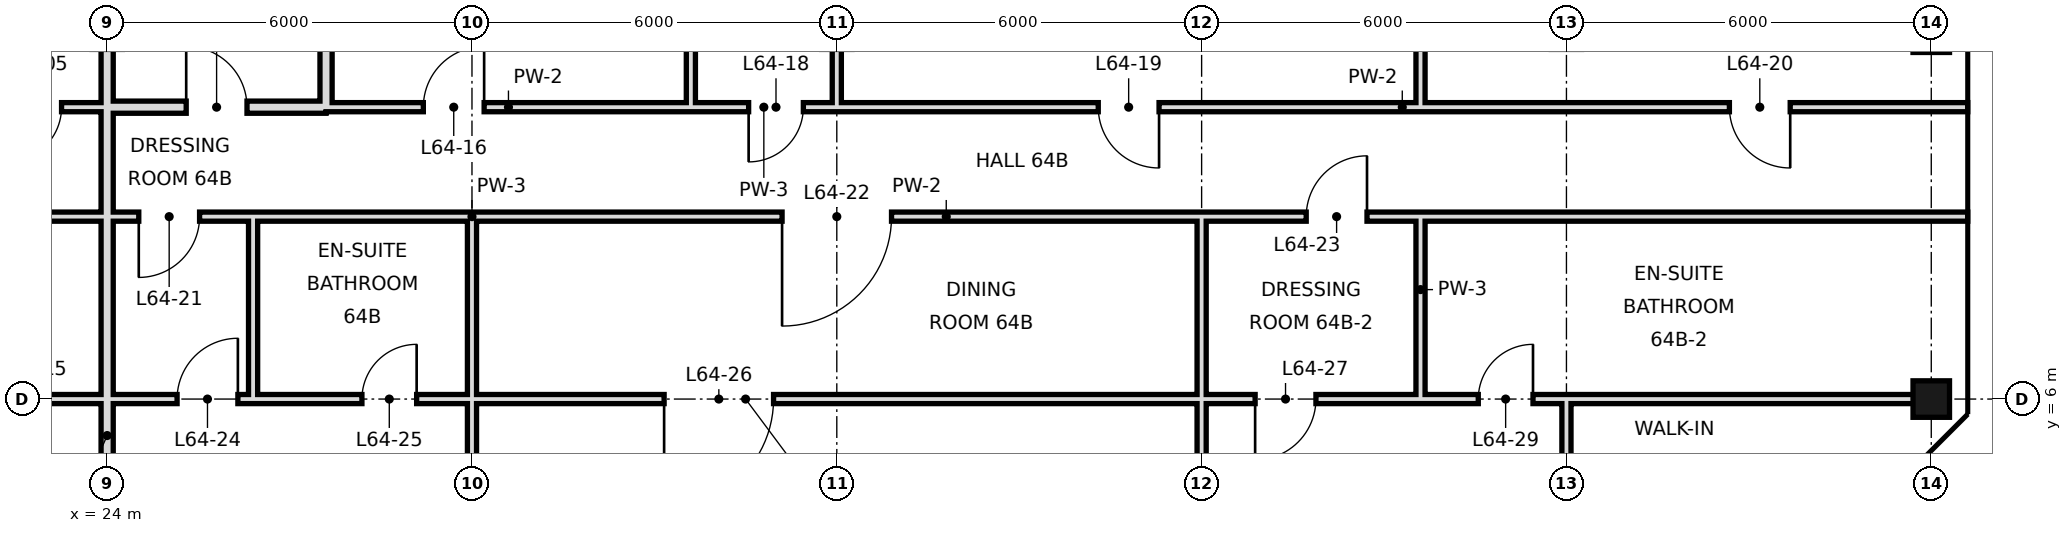
"""IFC4 building model, lengths in metres.
Left out: names, types, materials, properties, quantities, classifications, styles, units other than length and angle.
Written with IfcOpenShell. Run it as: python <this file> out.ifc"""

import sys

from ifc_helpers import new_model, si_unit, direction, frame, frame_2d, origin, origin_2d, place, context, subcontext, project, spatial, rectangle, hollow_rectangle, extrude, element, fill, save


model = new_model("IFC4")
c1 = context("Model", 3, precision=1e-05, world=origin(), true_north=direction((0.0, 1.0)))
c2 = subcontext(c1, "Body", "Model", "MODEL_VIEW")
j1 = project(units=[si_unit("LENGTHUNIT", "METRE"), si_unit("PLANEANGLEUNIT", "RADIAN")], contexts=[c1])
p1 = place(None, origin())
s1 = spatial("IfcSite", under=j1, at=p1, CompositionType="ELEMENT")
p2 = place(p1, origin())
s2 = spatial("IfcBuilding", under=s1, at=p2, CompositionType="ELEMENT")
p3 = place(p2, frame((0.0, 0.0, 270.2)))
s3 = spatial("IfcBuildingStorey", under=s2, at=p3, CompositionType="ELEMENT", Elevation=270.2)
p4 = place(p3, frame((54.0, 6.0, 0.0), z_axis=(0.0, 0.0, 1.0), x_axis=(1.0, 0.0, 0.0)))
e1 = element("IfcColumn", 1, at=p4, inside=s3, PredefinedType="COLUMN", context=c2, shape_type="SweptSolid", body=[
    extrude(hollow_rectangle(XDim=0.6, YDim=0.6, WallThickness=0.028, at=origin_2d()), origin(), (0.0, 0.0, 1.0), 3.6),
])
p5 = place(p3, frame((24.0, 10.8, 0.0), z_axis=(0.0, 0.0, 1.0), x_axis=(0.0, 1.0, 0.0)))
e2 = element("IfcWall", 2, at=p5, inside=s3, PredefinedType="SOLIDWALL", context=c2, shape_type="SweptSolid", body=[
    extrude(rectangle(XDim=7.9, YDim=0.2, at=frame_2d((3.95, 0.0))), origin(), (0.0, 0.0, 1.0), 2.72),
])
p6 = place(p3, frame((24.0, 0.0, 0.0), z_axis=(0.0, 0.0, 1.0), x_axis=(0.0, 1.0, 0.0)))
e3 = element("IfcWall", 3, at=p6, inside=s3, PredefinedType="SOLIDWALL", context=c2, shape_type="SweptSolid", body=[
    extrude(rectangle(XDim=10.8, YDim=0.2, at=frame_2d((5.4, 0.0))), origin(), (0.0, 0.0, 1.0), 2.72),
])
p7 = place(p3, frame((26.4, 6.0, 0.0), z_axis=(0.0, 0.0, 1.0), x_axis=(0.0, 1.0, 0.0)))
e4 = element("IfcWall", 4, at=p7, inside=s3, PredefinedType="PARTITIONING", context=c2, shape_type="SweptSolid", body=[
    extrude(rectangle(XDim=3.0, YDim=0.15, at=frame_2d((1.5, 0.0))), origin(), (0.0, 0.0, 1.0), 3.42),
])
p8 = place(p3, frame((27.6, 10.8, 0.0), z_axis=(0.0, 0.0, 1.0), x_axis=(0.0, 1.0, 0.0)))
e5 = element("IfcWall", 5, at=p8, inside=s3, PredefinedType="SOLIDWALL", context=c2, shape_type="SweptSolid", body=[
    extrude(rectangle(XDim=7.9, YDim=0.2, at=frame_2d((3.95, 0.0))), origin(), (0.0, 0.0, 1.0), 2.72),
])
p9 = place(p3, frame((30.0, -0.6, 0.0), z_axis=(0.0, 0.0, 1.0), x_axis=(0.0, 1.0, 0.0)))
e6 = element("IfcWall", 6, at=p9, inside=s3, PredefinedType="PARTITIONING", context=c2, shape_type="SweptSolid", body=[
    extrude(rectangle(XDim=6.6, YDim=0.15, at=frame_2d((3.3, 0.0))), origin(), (0.0, 0.0, 1.0), 2.72),
])
p10 = place(p3, frame((30.0, 6.0, 0.0), z_axis=(0.0, 0.0, 1.0), x_axis=(0.0, 1.0, 0.0)))
e7 = element("IfcWall", 7, at=p10, inside=s3, PredefinedType="PARTITIONING", context=c2, shape_type="SweptSolid", body=[
    extrude(rectangle(XDim=3.0, YDim=0.15, at=frame_2d((1.5, 0.0))), origin(), (0.0, 0.0, 1.0), 2.72),
])
p11 = place(p3, frame((33.6, 10.8, 0.0), z_axis=(0.0, 0.0, 1.0), x_axis=(0.0, 1.0, 0.0)))
e8 = element("IfcWall", 8, at=p11, inside=s3, PredefinedType="PARTITIONING", context=c2, shape_type="SweptSolid", body=[
    extrude(rectangle(XDim=7.9, YDim=0.15, at=frame_2d((3.95, 0.0))), origin(), (0.0, 0.0, 1.0), 3.42),
])
p12 = place(p3, frame((36.0, 10.8, 0.0), z_axis=(0.0, 0.0, 1.0), x_axis=(0.0, 1.0, 0.0)))
e9 = element("IfcWall", 9, at=p12, inside=s3, PredefinedType="PARTITIONING", context=c2, shape_type="SweptSolid", body=[
    extrude(rectangle(XDim=7.9, YDim=0.15, at=frame_2d((3.95, 0.0))), origin(), (0.0, 0.0, 1.0), 2.72),
])
p13 = place(p3, frame((42.0, -0.6, 0.0), z_axis=(0.0, 0.0, 1.0), x_axis=(0.0, 1.0, 0.0)))
e10 = element("IfcWall", 10, at=p13, inside=s3, PredefinedType="PARTITIONING", context=c2, shape_type="SweptSolid", body=[
    extrude(rectangle(XDim=9.6, YDim=0.15, at=frame_2d((4.8, 0.0))), origin(), (0.0, 0.0, 1.0), 2.72),
])
p14 = place(p3, frame((45.6, 10.8, 0.0), z_axis=(0.0, 0.0, 1.0), x_axis=(0.0, 1.0, 0.0)))
e11 = element("IfcWall", 11, at=p14, inside=s3, PredefinedType="PARTITIONING", context=c2, shape_type="SweptSolid", body=[
    extrude(rectangle(XDim=7.2, YDim=0.15, at=frame_2d((3.6, 0.0))), origin(), (0.0, 0.0, 1.0), 3.42),
])
p15 = place(p3, frame((45.6, 6.0, 0.0), z_axis=(0.0, 0.0, 1.0), x_axis=(0.0, 1.0, 0.0)))
e12 = element("IfcWall", 12, at=p15, inside=s3, PredefinedType="PARTITIONING", context=c2, shape_type="SweptSolid", body=[
    extrude(rectangle(XDim=3.0, YDim=0.15, at=frame_2d((1.5, 0.0))), origin(), (0.0, 0.0, 1.0), 3.42),
])
p16 = place(p3, frame((48.0, 0.0, 0.0), z_axis=(0.0, 0.0, 1.0), x_axis=(0.0, 1.0, 0.0)))
e13 = element("IfcWall", 13, at=p16, inside=s3, PredefinedType="PARTITIONING", context=c2, shape_type="SweptSolid", body=[
    extrude(rectangle(XDim=6.0, YDim=0.15, at=frame_2d((3.0, 0.0))), origin(), (0.0, 0.0, 1.0), 2.72),
])
p17 = place(p16, frame((3.4, 0.0, 0.0)))
e14 = element("IfcOpeningElement", 14, at=p17, cuts=e13, PredefinedType="OPENING", context=c2, shape_type="SweptSolid", body=[
    extrude(rectangle(XDim=1.0, YDim=2.4, at=frame_2d((0.5, 1.2))), frame((0.0, 0.085, 0.0), z_axis=(0.0, -1.0, 0.0), x_axis=(1.0, 0.0, 0.0)), (0.0, 0.0, 1.0), 0.17),
])
p18 = place(p3, frame((24.0, 10.8, 0.0), z_axis=(0.0, 0.0, 1.0), x_axis=(1.0, 0.0, 0.0)))
e15 = element("IfcWall", 15, at=p18, inside=s3, PredefinedType="SOLIDWALL", context=c2, shape_type="SweptSolid", body=[
    extrude(rectangle(XDim=3.6, YDim=0.2, at=frame_2d((1.8, 0.0))), origin(), (0.0, 0.0, 1.0), 2.72),
])
p19 = place(p18, frame((1.3, 0.0, 0.0)))
e16 = element("IfcOpeningElement", 16, at=p19, cuts=e15, PredefinedType="OPENING", context=c2, shape_type="SweptSolid", body=[
    extrude(rectangle(XDim=1.0, YDim=2.4, at=frame_2d((0.5, 1.2))), frame((0.0, 0.11, 0.0), z_axis=(0.0, -1.0, 0.0), x_axis=(1.0, 0.0, 0.0)), (0.0, 0.0, 1.0), 0.22),
])
p20 = place(p3, frame((27.6, 10.8, 0.0), z_axis=(0.0, 0.0, 1.0), x_axis=(1.0, 0.0, 0.0)))
e17 = element("IfcWall", 17, at=p20, inside=s3, PredefinedType="PARTITIONING", context=c2, shape_type="SweptSolid", body=[
    extrude(rectangle(XDim=6.0, YDim=0.15, at=frame_2d((3.0, 0.0))), origin(), (0.0, 0.0, 1.0), 3.42),
])
p21 = place(p20, frame((1.6, 0.0, 0.0)))
e18 = element("IfcOpeningElement", 18, at=p21, cuts=e17, PredefinedType="OPENING", context=c2, shape_type="SweptSolid", body=[
    extrude(rectangle(XDim=1.0, YDim=2.4, at=frame_2d((0.5, 1.2))), frame((0.0, 0.085, 0.0), z_axis=(0.0, -1.0, 0.0), x_axis=(1.0, 0.0, 0.0)), (0.0, 0.0, 1.0), 0.17),
])
p22 = place(p3, frame((36.0, 10.8, 0.0), z_axis=(0.0, 0.0, 1.0), x_axis=(1.0, 0.0, 0.0)))
e19 = element("IfcWall", 19, at=p22, inside=s3, PredefinedType="PARTITIONING", context=c2, shape_type="SweptSolid", body=[
    extrude(rectangle(XDim=18.6, YDim=0.15, at=frame_2d((9.3, 0.0))), origin(), (0.0, 0.0, 1.0), 3.42),
])
p23 = place(p22, frame((4.3, 0.0, 0.0)))
e20 = element("IfcOpeningElement", 20, at=p23, cuts=e19, PredefinedType="OPENING", context=c2, shape_type="SweptSolid", body=[
    extrude(rectangle(XDim=1.0, YDim=2.4, at=frame_2d((0.5, 1.2))), frame((0.0, 0.085, 0.0), z_axis=(0.0, -1.0, 0.0), x_axis=(1.0, 0.0, 0.0)), (0.0, 0.0, 1.0), 0.17),
])
p24 = place(p22, frame((14.68, 0.0, 0.0)))
e21 = element("IfcOpeningElement", 21, at=p24, cuts=e19, PredefinedType="OPENING", context=c2, shape_type="SweptSolid", body=[
    extrude(rectangle(XDim=1.0, YDim=2.4, at=frame_2d((0.5, 1.2))), frame((0.0, 0.085, 0.0), z_axis=(0.0, -1.0, 0.0), x_axis=(1.0, 0.0, 0.0)), (0.0, 0.0, 1.0), 0.17),
])
p25 = place(p3, frame((21.6, 10.8, 0.0), z_axis=(0.0, 0.0, 1.0), x_axis=(1.0, 0.0, 0.0)))
e22 = element("IfcWall", 22, at=p25, inside=s3, PredefinedType="PARTITIONING", context=c2, shape_type="SweptSolid", body=[
    extrude(rectangle(XDim=2.4, YDim=0.15, at=frame_2d((1.2, 0.0))), origin(), (0.0, 0.0, 1.0), 3.42),
])
p26 = place(p25, frame((0.75, 0.0, 0.0)))
e23 = element("IfcOpeningElement", 23, at=p26, cuts=e22, PredefinedType="OPENING", context=c2, shape_type="SweptSolid", body=[
    extrude(rectangle(XDim=0.9, YDim=2.4, at=frame_2d((0.45, 1.2))), frame((0.0, 0.085, 0.0), z_axis=(0.0, -1.0, 0.0), x_axis=(1.0, 0.0, 0.0)), (0.0, 0.0, 1.0), 0.17),
])
p27 = place(p3, frame((33.6, 10.8, 0.0), z_axis=(0.0, 0.0, 1.0), x_axis=(1.0, 0.0, 0.0)))
e24 = element("IfcWall", 24, at=p27, inside=s3, PredefinedType="PARTITIONING", context=c2, shape_type="SweptSolid", body=[
    extrude(rectangle(XDim=2.4, YDim=0.15, at=frame_2d((1.2, 0.0))), origin(), (0.0, 0.0, 1.0), 3.42),
])
p28 = place(p27, frame((0.95, 0.0, 0.0)))
e25 = element("IfcOpeningElement", 25, at=p28, cuts=e24, PredefinedType="OPENING", context=c2, shape_type="SweptSolid", body=[
    extrude(rectangle(XDim=0.9, YDim=2.4, at=frame_2d((0.45, 1.2))), frame((0.0, 0.085, 0.0), z_axis=(0.0, -1.0, 0.0), x_axis=(1.0, 0.0, 0.0)), (0.0, 0.0, 1.0), 0.17),
])
p29 = place(p3, frame((24.0, 6.0, 0.0), z_axis=(0.0, 0.0, 1.0), x_axis=(1.0, 0.0, 0.0)))
e26 = element("IfcWall", 26, at=p29, inside=s3, PredefinedType="PARTITIONING", context=c2, shape_type="SweptSolid", body=[
    extrude(rectangle(XDim=2.4, YDim=0.15, at=frame_2d((1.2, 0.0))), origin(), (0.0, 0.0, 1.0), 2.97),
])
p30 = place(p29, frame((1.15, 0.0, 0.0)))
e27 = element("IfcOpeningElement", 27, at=p30, cuts=e26, PredefinedType="OPENING", context=c2, shape_type="SweptSolid", body=[
    extrude(rectangle(XDim=1.0, YDim=2.4, at=frame_2d((0.5, 1.2))), frame((0.0, 0.085, 0.0), z_axis=(0.0, -1.0, 0.0), x_axis=(1.0, 0.0, 0.0)), (0.0, 0.0, 1.0), 0.17),
])
p31 = place(p3, frame((30.0, 6.0, 0.0), z_axis=(0.0, 0.0, 1.0), x_axis=(1.0, 0.0, 0.0)))
e28 = element("IfcWall", 28, at=p31, inside=s3, PredefinedType="PARTITIONING", context=c2, shape_type="SweptSolid", body=[
    extrude(rectangle(XDim=15.6, YDim=0.15, at=frame_2d((7.8, 0.0))), origin(), (0.0, 0.0, 1.0), 2.97),
])
p32 = place(p31, frame((3.16, 0.0, 0.0)))
e29 = element("IfcOpeningElement", 29, at=p32, cuts=e28, PredefinedType="OPENING", context=c2, shape_type="SweptSolid", body=[
    extrude(rectangle(XDim=1.8, YDim=2.4, at=frame_2d((0.9, 1.2))), frame((0.0, 0.085, 0.0), z_axis=(0.0, -1.0, 0.0), x_axis=(1.0, 0.0, 0.0)), (0.0, 0.0, 1.0), 0.17),
])
p33 = place(p31, frame((12.88, 0.0, 0.0)))
e30 = element("IfcOpeningElement", 30, at=p33, cuts=e28, PredefinedType="OPENING", context=c2, shape_type="SweptSolid", body=[
    extrude(rectangle(XDim=1.0, YDim=2.4, at=frame_2d((0.5, 1.2))), frame((0.0, 0.085, 0.0), z_axis=(0.0, -1.0, 0.0), x_axis=(1.0, 0.0, 0.0)), (0.0, 0.0, 1.0), 0.17),
])
p34 = place(p3, frame((21.6, 6.0, 0.0), z_axis=(0.0, 0.0, 1.0), x_axis=(1.0, 0.0, 0.0)))
e31 = element("IfcWall", 31, at=p34, inside=s3, PredefinedType="PARTITIONING", context=c2, shape_type="SweptSolid", body=[
    extrude(rectangle(XDim=2.4, YDim=0.15, at=frame_2d((1.2, 0.0))), origin(), (0.0, 0.0, 1.0), 2.97),
])
p35 = place(p34, frame((0.25, 0.0, 0.0)))
e32 = element("IfcOpeningElement", 32, at=p35, cuts=e31, PredefinedType="OPENING", context=c2, shape_type="SweptSolid", body=[
    extrude(rectangle(XDim=0.9, YDim=2.4, at=frame_2d((0.45, 1.2))), frame((0.0, 0.085, 0.0), z_axis=(0.0, -1.0, 0.0), x_axis=(1.0, 0.0, 0.0)), (0.0, 0.0, 1.0), 0.17),
])
p36 = place(p3, frame((26.4, 6.0, 0.0), z_axis=(0.0, 0.0, 1.0), x_axis=(1.0, 0.0, 0.0)))
e33 = element("IfcWall", 33, at=p36, inside=s3, PredefinedType="PARTITIONING", context=c2, shape_type="SweptSolid", body=[
    extrude(rectangle(XDim=3.6, YDim=0.15, at=frame_2d((1.8, 0.0))), origin(), (0.0, 0.0, 1.0), 2.97),
])
p37 = place(p36, frame((1.79, 0.0, 0.0)))
e34 = element("IfcOpeningElement", 34, at=p37, cuts=e33, PredefinedType="OPENING", context=c2, shape_type="SweptSolid", body=[
    extrude(rectangle(XDim=0.9, YDim=2.4, at=frame_2d((0.45, 1.2))), frame((0.0, 0.085, 0.0), z_axis=(0.0, -1.0, 0.0), x_axis=(1.0, 0.0, 0.0)), (0.0, 0.0, 1.0), 0.17),
])
p38 = place(p3, frame((45.6, 6.0, 0.0), z_axis=(0.0, 0.0, 1.0), x_axis=(1.0, 0.0, 0.0)))
e35 = element("IfcWall", 35, at=p38, inside=s3, PredefinedType="PARTITIONING", context=c2, shape_type="SweptSolid", body=[
    extrude(rectangle(XDim=8.4, YDim=0.15, at=frame_2d((4.2, 0.0))), origin(), (0.0, 0.0, 1.0), 2.97),
])
p39 = place(p38, frame((0.95, 0.0, 0.0)))
e36 = element("IfcOpeningElement", 36, at=p39, cuts=e35, PredefinedType="OPENING", context=c2, shape_type="SweptSolid", body=[
    extrude(rectangle(XDim=0.9, YDim=2.4, at=frame_2d((0.45, 1.2))), frame((0.0, 0.085, 0.0), z_axis=(0.0, -1.0, 0.0), x_axis=(1.0, 0.0, 0.0)), (0.0, 0.0, 1.0), 0.17),
])
p40 = place(p3, frame((24.0, 9.0, 0.0), z_axis=(0.0, 0.0, 1.0), x_axis=(1.0, 0.0, 0.0)))
e37 = element("IfcWall", 37, at=p40, inside=s3, PredefinedType="PARTITIONING", context=c2, shape_type="SweptSolid", body=[
    extrude(rectangle(XDim=2.4, YDim=0.15, at=frame_2d((1.2, 0.0))), origin(), (0.0, 0.0, 1.0), 3.42),
])
p41 = place(p40, frame((0.52, 0.0, 0.0)))
e38 = element("IfcOpeningElement", 38, at=p41, cuts=e37, PredefinedType="OPENING", context=c2, shape_type="SweptSolid", body=[
    extrude(rectangle(XDim=1.0, YDim=2.4, at=frame_2d((0.5, 1.2))), frame((0.0, 0.085, 0.0), z_axis=(0.0, -1.0, 0.0), x_axis=(1.0, 0.0, 0.0)), (0.0, 0.0, 1.0), 0.17),
])
p42 = place(p3, frame((30.0, 9.0, 0.0), z_axis=(0.0, 0.0, 1.0), x_axis=(1.0, 0.0, 0.0)))
e39 = element("IfcWall", 39, at=p42, inside=s3, PredefinedType="PARTITIONING", context=c2, shape_type="SweptSolid", body=[
    extrude(rectangle(XDim=15.6, YDim=0.15, at=frame_2d((7.8, 0.0))), origin(), (0.0, 0.0, 1.0), 3.42),
])
p43 = place(p42, frame((5.1, 0.0, 0.0)))
e40 = element("IfcOpeningElement", 40, at=p43, cuts=e39, PredefinedType="OPENING", context=c2, shape_type="SweptSolid", body=[
    extrude(rectangle(XDim=1.8, YDim=2.4, at=frame_2d((0.9, 1.2))), frame((0.0, 0.085, 0.0), z_axis=(0.0, -1.0, 0.0), x_axis=(1.0, 0.0, 0.0)), (0.0, 0.0, 1.0), 0.17),
])
p44 = place(p42, frame((13.72, 0.0, 0.0)))
e41 = element("IfcOpeningElement", 41, at=p44, cuts=e39, PredefinedType="OPENING", context=c2, shape_type="SweptSolid", body=[
    extrude(rectangle(XDim=1.0, YDim=2.4, at=frame_2d((0.5, 1.2))), frame((0.0, 0.085, 0.0), z_axis=(0.0, -1.0, 0.0), x_axis=(1.0, 0.0, 0.0)), (0.0, 0.0, 1.0), 0.17),
])
p45 = place(p3, frame((21.6, 9.0, 0.0), z_axis=(0.0, 0.0, 1.0), x_axis=(1.0, 0.0, 0.0)))
e42 = element("IfcWall", 42, at=p45, inside=s3, PredefinedType="PARTITIONING", context=c2, shape_type="SweptSolid", body=[
    extrude(rectangle(XDim=2.4, YDim=0.15, at=frame_2d((1.2, 0.0))), origin(), (0.0, 0.0, 1.0), 3.42),
])
p46 = place(p3, frame((26.4, 9.0, 0.0), z_axis=(0.0, 0.0, 1.0), x_axis=(1.0, 0.0, 0.0)))
e43 = element("IfcWall", 43, at=p46, inside=s3, PredefinedType="PARTITIONING", context=c2, shape_type="SweptSolid", body=[
    extrude(rectangle(XDim=3.6, YDim=0.15, at=frame_2d((1.8, 0.0))), origin(), (0.0, 0.0, 1.0), 3.42),
])
p47 = place(p3, frame((45.6, 9.0, 0.0), z_axis=(0.0, 0.0, 1.0), x_axis=(1.0, 0.0, 0.0)))
e44 = element("IfcWall", 44, at=p47, inside=s3, PredefinedType="PARTITIONING", context=c2, shape_type="SweptSolid", body=[
    extrude(rectangle(XDim=9.0, YDim=0.15, at=frame_2d((4.5, 0.0))), origin(), (0.0, 0.0, 1.0), 3.42),
])
p48 = place(p26, frame((0.9, 0.0, 0.0), z_axis=(0.0, 0.0, 1.0), x_axis=(-1.0, 0.0, 0.0)))
e45 = element("IfcDoor", 45, at=p48, inside=s3, OperationType="SINGLE_SWING_RIGHT", PredefinedType="DOOR", context=c2, shape_type="SweptSolid", body=[
    extrude(rectangle(XDim=0.9, YDim=2.4, at=frame_2d((0.45, 1.2))), frame((0.0, 0.025, 0.0), z_axis=(0.0, -1.0, 0.0), x_axis=(1.0, 0.0, 0.0)), (0.0, 0.0, 1.0), 0.05),
])
fill(e23, e45)
p49 = place(p21, frame((1.0, 0.0, 0.0), z_axis=(0.0, 0.0, 1.0), x_axis=(-1.0, 0.0, 0.0)))
e46 = element("IfcDoor", 46, at=p49, inside=s3, OperationType="SINGLE_SWING_LEFT", PredefinedType="DOOR", context=c2, shape_type="SweptSolid", body=[
    extrude(rectangle(XDim=1.0, YDim=2.4, at=frame_2d((0.5, 1.2))), frame((0.0, 0.025, 0.0), z_axis=(0.0, -1.0, 0.0), x_axis=(1.0, 0.0, 0.0)), (0.0, 0.0, 1.0), 0.05),
])
fill(e18, e46)
p50 = place(p19, origin())
e47 = element("IfcDoor", 47, at=p50, inside=s3, OperationType="SINGLE_SWING_LEFT", PredefinedType="DOOR", context=c2, shape_type="SweptSolid", body=[
    extrude(rectangle(XDim=1.0, YDim=2.4, at=frame_2d((0.5, 1.2))), frame((0.0, 0.025, 0.0), z_axis=(0.0, -1.0, 0.0), x_axis=(1.0, 0.0, 0.0)), (0.0, 0.0, 1.0), 0.05),
])
fill(e16, e47)
p51 = place(p28, frame((0.9, 0.0, 0.0), z_axis=(0.0, 0.0, 1.0), x_axis=(-1.0, 0.0, 0.0)))
e48 = element("IfcDoor", 48, at=p51, inside=s3, OperationType="SINGLE_SWING_RIGHT", PredefinedType="DOOR", context=c2, shape_type="SweptSolid", body=[
    extrude(rectangle(XDim=0.9, YDim=2.4, at=frame_2d((0.45, 1.2))), frame((0.0, 0.025, 0.0), z_axis=(0.0, -1.0, 0.0), x_axis=(1.0, 0.0, 0.0)), (0.0, 0.0, 1.0), 0.05),
])
fill(e25, e48)
p52 = place(p23, origin())
e49 = element("IfcDoor", 49, at=p52, inside=s3, OperationType="SINGLE_SWING_RIGHT", PredefinedType="DOOR", context=c2, shape_type="SweptSolid", body=[
    extrude(rectangle(XDim=1.0, YDim=2.4, at=frame_2d((0.5, 1.2))), frame((0.0, 0.025, 0.0), z_axis=(0.0, -1.0, 0.0), x_axis=(1.0, 0.0, 0.0)), (0.0, 0.0, 1.0), 0.05),
])
fill(e20, e49)
p53 = place(p24, origin())
e50 = element("IfcDoor", 50, at=p53, inside=s3, OperationType="SINGLE_SWING_RIGHT", PredefinedType="DOOR", context=c2, shape_type="SweptSolid", body=[
    extrude(rectangle(XDim=1.0, YDim=2.4, at=frame_2d((0.5, 1.2))), frame((0.0, 0.025, 0.0), z_axis=(0.0, -1.0, 0.0), x_axis=(1.0, 0.0, 0.0)), (0.0, 0.0, 1.0), 0.05),
])
fill(e21, e50)
p54 = place(p41, frame((1.0, 0.0, 0.0), z_axis=(0.0, 0.0, 1.0), x_axis=(-1.0, 0.0, 0.0)))
e51 = element("IfcDoor", 51, at=p54, inside=s3, OperationType="SINGLE_SWING_RIGHT", PredefinedType="DOOR", context=c2, shape_type="SweptSolid", body=[
    extrude(rectangle(XDim=1.0, YDim=2.4, at=frame_2d((0.5, 1.2))), frame((0.0, 0.025, 0.0), z_axis=(0.0, -1.0, 0.0), x_axis=(1.0, 0.0, 0.0)), (0.0, 0.0, 1.0), 0.05),
])
fill(e38, e51)
p55 = place(p43, frame((1.8, 0.0, 0.0), z_axis=(0.0, 0.0, 1.0), x_axis=(-1.0, 0.0, 0.0)))
e52 = element("IfcDoor", 52, at=p55, inside=s3, OperationType="SINGLE_SWING_RIGHT", PredefinedType="DOOR", context=c2, shape_type="SweptSolid", body=[
    extrude(rectangle(XDim=1.8, YDim=2.4, at=frame_2d((0.9, 1.2))), frame((0.0, 0.025, 0.0), z_axis=(0.0, -1.0, 0.0), x_axis=(1.0, 0.0, 0.0)), (0.0, 0.0, 1.0), 0.05),
])
fill(e40, e52)
p56 = place(p44, frame((1.0, 0.0, 0.0), z_axis=(0.0, 0.0, 1.0), x_axis=(-1.0, 0.0, 0.0)))
e53 = element("IfcDoor", 53, at=p56, inside=s3, OperationType="SINGLE_SWING_LEFT", PredefinedType="DOOR", context=c2, shape_type="SweptSolid", body=[
    extrude(rectangle(XDim=1.0, YDim=2.4, at=frame_2d((0.5, 1.2))), frame((0.0, 0.025, 0.0), z_axis=(0.0, -1.0, 0.0), x_axis=(1.0, 0.0, 0.0)), (0.0, 0.0, 1.0), 0.05),
])
fill(e41, e53)
p57 = place(p30, frame((1.0, 0.0, 0.0), z_axis=(0.0, 0.0, 1.0), x_axis=(-1.0, 0.0, 0.0)))
e54 = element("IfcDoor", 54, at=p57, inside=s3, OperationType="SINGLE_SWING_LEFT", PredefinedType="DOOR", context=c2, shape_type="SweptSolid", body=[
    extrude(rectangle(XDim=1.0, YDim=2.4, at=frame_2d((0.5, 1.2))), frame((0.0, 0.025, 0.0), z_axis=(0.0, -1.0, 0.0), x_axis=(1.0, 0.0, 0.0)), (0.0, 0.0, 1.0), 0.05),
])
fill(e27, e54)
p58 = place(p37, frame((0.9, 0.0, 0.0), z_axis=(0.0, 0.0, 1.0), x_axis=(-1.0, 0.0, 0.0)))
e55 = element("IfcDoor", 55, at=p58, inside=s3, OperationType="SINGLE_SWING_LEFT", PredefinedType="DOOR", context=c2, shape_type="SweptSolid", body=[
    extrude(rectangle(XDim=0.9, YDim=2.4, at=frame_2d((0.45, 1.2))), frame((0.0, 0.025, 0.0), z_axis=(0.0, -1.0, 0.0), x_axis=(1.0, 0.0, 0.0)), (0.0, 0.0, 1.0), 0.05),
])
fill(e34, e55)
p59 = place(p32, frame((1.8, 0.0, 0.0), z_axis=(0.0, 0.0, 1.0), x_axis=(-1.0, 0.0, 0.0)))
e56 = element("IfcDoor", 56, at=p59, inside=s3, OperationType="SINGLE_SWING_RIGHT", PredefinedType="DOOR", context=c2, shape_type="SweptSolid", body=[
    extrude(rectangle(XDim=1.8, YDim=2.4, at=frame_2d((0.9, 1.2))), frame((0.0, 0.025, 0.0), z_axis=(0.0, -1.0, 0.0), x_axis=(1.0, 0.0, 0.0)), (0.0, 0.0, 1.0), 0.05),
])
fill(e29, e56)
p60 = place(p33, frame((1.0, 0.0, 0.0), z_axis=(0.0, 0.0, 1.0), x_axis=(-1.0, 0.0, 0.0)))
e57 = element("IfcDoor", 57, at=p60, inside=s3, OperationType="SINGLE_SWING_RIGHT", PredefinedType="DOOR", context=c2, shape_type="SweptSolid", body=[
    extrude(rectangle(XDim=1.0, YDim=2.4, at=frame_2d((0.5, 1.2))), frame((0.0, 0.025, 0.0), z_axis=(0.0, -1.0, 0.0), x_axis=(1.0, 0.0, 0.0)), (0.0, 0.0, 1.0), 0.05),
])
fill(e30, e57)
p61 = place(p39, frame((0.9, 0.0, 0.0), z_axis=(0.0, 0.0, 1.0), x_axis=(-1.0, 0.0, 0.0)))
e58 = element("IfcDoor", 58, at=p61, inside=s3, OperationType="SINGLE_SWING_LEFT", PredefinedType="DOOR", context=c2, shape_type="SweptSolid", body=[
    extrude(rectangle(XDim=0.9, YDim=2.4, at=frame_2d((0.45, 1.2))), frame((0.0, 0.025, 0.0), z_axis=(0.0, -1.0, 0.0), x_axis=(1.0, 0.0, 0.0)), (0.0, 0.0, 1.0), 0.05),
])
fill(e36, e58)
save(model, sys.argv[1])
